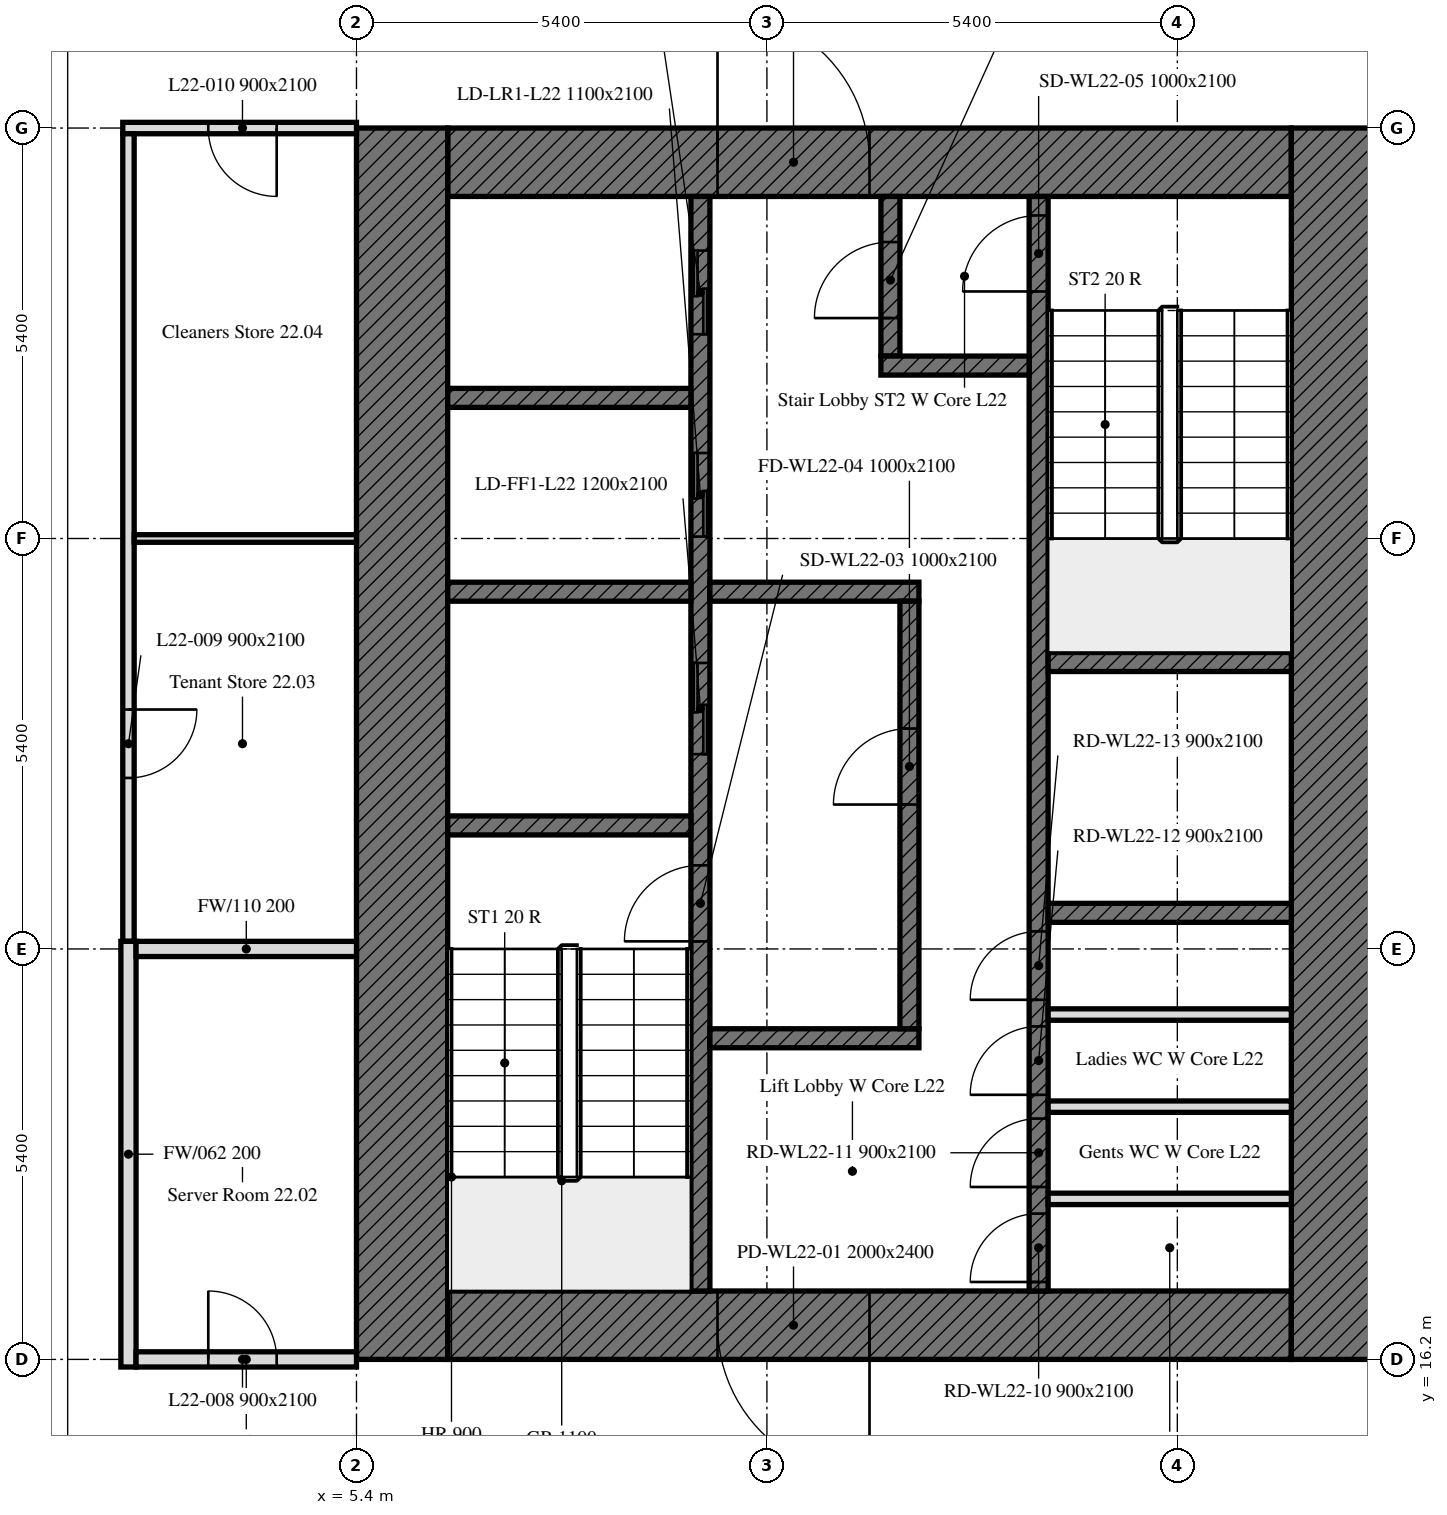
"""IFC4 building model, lengths in metres.
Left out: names, types, materials, properties, quantities, classifications, styles, units other than length and angle.
Written with IfcOpenShell. Run it as: python <this file> out.ifc"""

import sys

from ifc_helpers import new_model, si_unit, direction, frame, frame_2d, origin, place, context, subcontext, project, spatial, rectangle, extrude, element, fill, save


model = new_model("IFC4")
c1 = context("Model", 3, precision=1e-05, world=origin(), true_north=direction((0.0, 1.0)))
c2 = subcontext(c1, "Body", "Model", "MODEL_VIEW")
j1 = project(units=[si_unit("LENGTHUNIT", "METRE"), si_unit("PLANEANGLEUNIT", "RADIAN")], contexts=[c1])
p1 = place(None, origin())
s1 = spatial("IfcSite", under=j1, at=p1, CompositionType="ELEMENT")
p2 = place(p1, origin())
s2 = spatial("IfcBuilding", under=s1, at=p2, CompositionType="ELEMENT")
p3 = place(p2, frame((0.0, 0.0, 95.4)))
s3 = spatial("IfcBuildingStorey", under=s2, at=p3, CompositionType="ELEMENT", Elevation=95.4)
p4 = place(p3, frame((17.7, 16.65, 0.0), z_axis=(0.0, 0.0, 1.0), x_axis=(-1.0, 0.0, 0.0)))
e1 = element("IfcWall", 1, at=p4, inside=s3, PredefinedType="SOLIDWALL", context=c2, shape_type="SweptSolid", body=[
    extrude(rectangle(XDim=11.1, YDim=0.9, at=frame_2d((5.55, 0.0))), origin(), (0.0, 0.0, 1.0), 3.5),
])
p5 = place(p4, frame((5.55, 0.0, 0.0)))
e2 = element("IfcOpeningElement", 2, at=p5, cuts=e1, PredefinedType="OPENING", context=c2, shape_type="SweptSolid", body=[
    extrude(rectangle(XDim=2.0, YDim=2.4, at=frame_2d((1.0, 1.2))), frame((0.0, 0.45, 0.0), z_axis=(0.0, -1.0, 0.0), x_axis=(1.0, 0.0, 0.0)), (0.0, 0.0, 1.0), 0.9),
])
p6 = place(p3, frame((6.6, 31.95, 0.0), z_axis=(0.0, 0.0, 1.0), x_axis=(1.0, 0.0, 0.0)))
e3 = element("IfcWall", 3, at=p6, inside=s3, PredefinedType="SOLIDWALL", context=c2, shape_type="SweptSolid", body=[
    extrude(rectangle(XDim=11.1, YDim=0.9, at=frame_2d((5.55, 0.0))), origin(), (0.0, 0.0, 1.0), 3.5),
])
p7 = place(p6, frame((3.55, 0.0, 0.0)))
e4 = element("IfcOpeningElement", 4, at=p7, cuts=e3, PredefinedType="OPENING", context=c2, shape_type="SweptSolid", body=[
    extrude(rectangle(XDim=2.0, YDim=2.4, at=frame_2d((1.0, 1.2))), frame((0.0, 0.45, 0.0), z_axis=(0.0, -1.0, 0.0), x_axis=(1.0, 0.0, 0.0)), (0.0, 0.0, 1.0), 0.9),
])
for number, where, z_axis, x_axis in (
    (5, (6.0, 16.2, 0.0), (0.0, 0.0, 1.0), (0.0, 1.0, 0.0)),
    (6, (18.3, 32.4, 0.0), (0.0, 0.0, 1.0), (0.0, -1.0, 0.0)),
):
    element("IfcWall", number, at=place(p3, frame(where, z_axis=z_axis, x_axis=x_axis)), inside=s3, PredefinedType="SOLIDWALL", context=c2, shape_type="SweptSolid", body=[
        extrude(rectangle(XDim=16.2, YDim=1.2, at=frame_2d((8.1, 0.0))), origin(), (0.0, 0.0, 1.0), 3.5),
    ])
p8 = place(p3, frame((9.925, 17.1, 0.0), z_axis=(0.0, 0.0, 1.0), x_axis=(0.0, 1.0, 0.0)))
e7 = element("IfcWall", 7, at=p8, inside=s3, PredefinedType="SOLIDWALL", context=c2, shape_type="SweptSolid", body=[
    extrude(rectangle(XDim=14.4, YDim=0.25, at=frame_2d((7.2, 0.0))), origin(), (0.0, 0.0, 1.0), 3.5),
])
p9 = place(p8, frame((4.6, 0.0, 0.0)))
e8 = element("IfcOpeningElement", 8, at=p9, cuts=e7, PredefinedType="OPENING", context=c2, shape_type="SweptSolid", body=[
    extrude(rectangle(XDim=1.0, YDim=2.1, at=frame_2d((0.5, 1.05))), frame((0.0, 0.125, 0.0), z_axis=(0.0, -1.0, 0.0), x_axis=(1.0, 0.0, 0.0)), (0.0, 0.0, 1.0), 0.25),
])
p10 = place(p8, frame((7.062, 0.0, 0.0)))
e9 = element("IfcOpeningElement", 9, at=p10, cuts=e7, PredefinedType="OPENING", context=c2, shape_type="SweptSolid", body=[
    extrude(rectangle(XDim=1.2, YDim=2.1, at=frame_2d((0.6, 1.05))), frame((0.0, 0.125, 0.0), z_axis=(0.0, -1.0, 0.0), x_axis=(1.0, 0.0, 0.0)), (0.0, 0.0, 1.0), 0.25),
])
p11 = place(p8, frame((9.925, 0.0, 0.0)))
e10 = element("IfcOpeningElement", 10, at=p11, cuts=e7, PredefinedType="OPENING", context=c2, shape_type="SweptSolid", body=[
    extrude(rectangle(XDim=1.1, YDim=2.1, at=frame_2d((0.55, 1.05))), frame((0.0, 0.125, 0.0), z_axis=(0.0, -1.0, 0.0), x_axis=(1.0, 0.0, 0.0)), (0.0, 0.0, 1.0), 0.25),
])
p12 = place(p8, frame((12.587, 0.0, 0.0)))
e11 = element("IfcOpeningElement", 11, at=p12, cuts=e7, PredefinedType="OPENING", context=c2, shape_type="SweptSolid", body=[
    extrude(rectangle(XDim=1.1, YDim=2.1, at=frame_2d((0.55, 1.05))), frame((0.0, 0.125, 0.0), z_axis=(0.0, -1.0, 0.0), x_axis=(1.0, 0.0, 0.0)), (0.0, 0.0, 1.0), 0.25),
])
p13 = place(p3, frame((14.375, 17.1, 0.0), z_axis=(0.0, 0.0, 1.0), x_axis=(0.0, 1.0, 0.0)))
e12 = element("IfcWall", 12, at=p13, inside=s3, PredefinedType="SOLIDWALL", context=c2, shape_type="SweptSolid", body=[
    extrude(rectangle(XDim=14.4, YDim=0.25, at=frame_2d((7.2, 0.0))), origin(), (0.0, 0.0, 1.0), 3.5),
])
p14 = place(p13, frame((13.15, 0.0, 0.0)))
e13 = element("IfcOpeningElement", 13, at=p14, cuts=e12, PredefinedType="OPENING", context=c2, shape_type="SweptSolid", body=[
    extrude(rectangle(XDim=1.0, YDim=2.1, at=frame_2d((0.5, 1.05))), frame((0.0, 0.125, 0.0), z_axis=(0.0, -1.0, 0.0), x_axis=(1.0, 0.0, 0.0)), (0.0, 0.0, 1.0), 0.25),
])
p15 = place(p13, frame((0.118, 0.0, 0.0)))
e14 = element("IfcOpeningElement", 14, at=p15, cuts=e12, PredefinedType="OPENING", context=c2, shape_type="SweptSolid", body=[
    extrude(rectangle(XDim=0.9, YDim=2.1, at=frame_2d((0.45, 1.05))), frame((0.0, 0.125, 0.0), z_axis=(0.0, -1.0, 0.0), x_axis=(1.0, 0.0, 0.0)), (0.0, 0.0, 1.0), 0.25),
])
p16 = place(p13, frame((1.368, 0.0, 0.0)))
e15 = element("IfcOpeningElement", 15, at=p16, cuts=e12, PredefinedType="OPENING", context=c2, shape_type="SweptSolid", body=[
    extrude(rectangle(XDim=0.9, YDim=2.1, at=frame_2d((0.45, 1.05))), frame((0.0, 0.125, 0.0), z_axis=(0.0, -1.0, 0.0), x_axis=(1.0, 0.0, 0.0)), (0.0, 0.0, 1.0), 0.25),
])
p17 = place(p13, frame((2.581, 0.0, 0.0)))
e16 = element("IfcOpeningElement", 16, at=p17, cuts=e12, PredefinedType="OPENING", context=c2, shape_type="SweptSolid", body=[
    extrude(rectangle(XDim=0.9, YDim=2.1, at=frame_2d((0.45, 1.05))), frame((0.0, 0.125, 0.0), z_axis=(0.0, -1.0, 0.0), x_axis=(1.0, 0.0, 0.0)), (0.0, 0.0, 1.0), 0.25),
])
p18 = place(p13, frame((3.831, 0.0, 0.0)))
e17 = element("IfcOpeningElement", 17, at=p18, cuts=e12, PredefinedType="OPENING", context=c2, shape_type="SweptSolid", body=[
    extrude(rectangle(XDim=0.9, YDim=2.1, at=frame_2d((0.45, 1.05))), frame((0.0, 0.125, 0.0), z_axis=(0.0, -1.0, 0.0), x_axis=(1.0, 0.0, 0.0)), (0.0, 0.0, 1.0), 0.25),
])
for number, where, z_axis, x_axis in (
    (18, (6.6, 23.225, 0.0), (0.0, 0.0, 1.0), (1.0, 0.0, 0.0)),
    (19, (14.5, 25.375, 0.0), (0.0, 0.0, 1.0), (1.0, 0.0, 0.0)),
    (20, (14.5, 22.075, 0.0), (0.0, 0.0, 1.0), (1.0, 0.0, 0.0)),
    (21, (6.6, 26.3, 0.0), (0.0, 0.0, 1.0), (1.0, 0.0, 0.0)),
):
    element("IfcWall", number, at=place(p3, frame(where, z_axis=z_axis, x_axis=x_axis)), inside=s3, PredefinedType="SOLIDWALL", context=c2, shape_type="SweptSolid", body=[
        extrude(rectangle(XDim=3.2, YDim=0.25, at=frame_2d((1.6, 0.0))), origin(), (0.0, 0.0, 1.0), 3.5),
    ])
for number, where, z_axis, x_axis in (
    (22, (10.05, 26.3, 0.0), (0.0, 0.0, 1.0), (1.0, 0.0, 0.0)),
    (23, (10.05, 20.425, 0.0), (0.0, 0.0, 1.0), (1.0, 0.0, 0.0)),
):
    element("IfcWall", number, at=place(p3, frame(where, z_axis=z_axis, x_axis=x_axis)), inside=s3, PredefinedType="SOLIDWALL", context=c2, shape_type="SweptSolid", body=[
        extrude(rectangle(XDim=2.75, YDim=0.25, at=frame_2d((1.375, 0.0))), origin(), (0.0, 0.0, 1.0), 3.5),
    ])
p19 = place(p3, frame((12.425, 29.4, 0.0), z_axis=(0.0, 0.0, 1.0), x_axis=(0.0, 1.0, 0.0)))
e24 = element("IfcWall", 24, at=p19, inside=s3, PredefinedType="SOLIDWALL", context=c2, shape_type="SweptSolid", body=[
    extrude(rectangle(XDim=2.1, YDim=0.25, at=frame_2d((1.05, 0.0))), origin(), (0.0, 0.0, 1.0), 3.5),
])
p20 = place(p19, frame((0.5, 0.0, 0.0)))
e25 = element("IfcOpeningElement", 25, at=p20, cuts=e24, PredefinedType="OPENING", context=c2, shape_type="SweptSolid", body=[
    extrude(rectangle(XDim=1.0, YDim=2.1, at=frame_2d((0.5, 1.05))), frame((0.0, 0.125, 0.0), z_axis=(0.0, -1.0, 0.0), x_axis=(1.0, 0.0, 0.0)), (0.0, 0.0, 1.0), 0.25),
])
p21 = place(p3, frame((12.3, 29.275, 0.0), z_axis=(0.0, 0.0, 1.0), x_axis=(1.0, 0.0, 0.0)))
e26 = element("IfcWall", 26, at=p21, inside=s3, PredefinedType="SOLIDWALL", context=c2, shape_type="SweptSolid", body=[
    extrude(rectangle(XDim=1.95, YDim=0.25, at=frame_2d((0.975, 0.0))), origin(), (0.0, 0.0, 1.0), 3.5),
])
p22 = place(p3, frame((12.675, 20.55, 0.0), z_axis=(0.0, 0.0, 1.0), x_axis=(0.0, 1.0, 0.0)))
e27 = element("IfcWall", 27, at=p22, inside=s3, PredefinedType="SOLIDWALL", context=c2, shape_type="SweptSolid", body=[
    extrude(rectangle(XDim=5.625, YDim=0.25, at=frame_2d((2.812, 0.0))), origin(), (0.0, 0.0, 1.0), 3.5),
])
p23 = place(p22, frame((2.95, 0.0, 0.0)))
e28 = element("IfcOpeningElement", 28, at=p23, cuts=e27, PredefinedType="OPENING", context=c2, shape_type="SweptSolid", body=[
    extrude(rectangle(XDim=1.0, YDim=2.1, at=frame_2d((0.5, 1.05))), frame((0.0, 0.125, 0.0), z_axis=(0.0, -1.0, 0.0), x_axis=(1.0, 0.0, 0.0)), (0.0, 0.0, 1.0), 0.25),
])
p24 = place(p3, frame((6.6, 28.85, 0.0), z_axis=(0.0, 0.0, 1.0), x_axis=(1.0, 0.0, 0.0)))
e29 = element("IfcWall", 29, at=p24, inside=s3, PredefinedType="SOLIDWALL", context=c2, shape_type="SweptSolid", body=[
    extrude(rectangle(XDim=3.2, YDim=0.25, at=frame_2d((1.6, 0.0))), origin(), (0.0, 0.0, 1.0), 3.5),
])
for number, where, z_axis, x_axis in (
    (30, (14.5, 18.312, 0.0), (0.0, 0.0, 1.0), (1.0, 0.0, 0.0)),
    (31, (14.5, 19.525, 0.0), (0.0, 0.0, 1.0), (1.0, 0.0, 0.0)),
    (32, (14.5, 20.737, 0.0), (0.0, 0.0, 1.0), (1.0, 0.0, 0.0)),
):
    element("IfcWall", number, at=place(p3, frame(where, z_axis=z_axis, x_axis=x_axis)), inside=s3, PredefinedType="PARTITIONING", context=c2, shape_type="SweptSolid", body=[
        extrude(rectangle(XDim=3.2, YDim=0.15, at=frame_2d((1.6, 0.0))), origin(), (0.0, 0.0, 1.0), 3.5),
    ])
p25 = place(p3, frame((5.4, 32.4, 0.0), z_axis=(0.0, 0.0, 1.0), x_axis=(-1.0, 0.0, 0.0)))
e33 = element("IfcWall", 33, at=p25, inside=s3, PredefinedType="PARTITIONING", context=c2, shape_type="SweptSolid", body=[
    extrude(rectangle(XDim=3.075, YDim=0.15, at=frame_2d((1.538, 0.0))), origin(), (0.0, 0.0, 1.0), 2.75),
])
p26 = place(p25, frame((1.05, 0.0, 0.0)))
e34 = element("IfcOpeningElement", 34, at=p26, cuts=e33, PredefinedType="OPENING", context=c2, shape_type="SweptSolid", body=[
    extrude(rectangle(XDim=0.9, YDim=2.1, at=frame_2d((0.45, 1.05))), frame((0.0, 0.075, 0.0), z_axis=(0.0, -1.0, 0.0), x_axis=(1.0, 0.0, 0.0)), (0.0, 0.0, 1.0), 0.15),
])
p27 = place(p3, frame((2.4, 32.325, 0.0), z_axis=(0.0, 0.0, 1.0), x_axis=(0.0, -1.0, 0.0)))
e35 = element("IfcWall", 35, at=p27, inside=s3, PredefinedType="PARTITIONING", context=c2, shape_type="SweptSolid", body=[
    extrude(rectangle(XDim=10.625, YDim=0.15, at=frame_2d((5.312, 0.0))), origin(), (0.0, 0.0, 1.0), 3.5),
])
p28 = place(p27, frame((7.575, 0.0, 0.0)))
e36 = element("IfcOpeningElement", 36, at=p28, cuts=e35, PredefinedType="OPENING", context=c2, shape_type="SweptSolid", body=[
    extrude(rectangle(XDim=0.9, YDim=2.1, at=frame_2d((0.45, 1.05))), frame((0.0, 0.075, 0.0), z_axis=(0.0, -1.0, 0.0), x_axis=(1.0, 0.0, 0.0)), (0.0, 0.0, 1.0), 0.15),
])
p29 = place(p3, frame((2.4, 21.7, 0.0), z_axis=(0.0, 0.0, 1.0), x_axis=(0.0, -1.0, 0.0)))
e37 = element("IfcWall", 37, at=p29, inside=s3, PredefinedType="PARTITIONING", context=c2, shape_type="SweptSolid", body=[
    extrude(rectangle(XDim=5.6, YDim=0.2, at=frame_2d((2.8, 0.0))), origin(), (0.0, 0.0, 1.0), 3.5),
])
p30 = place(p3, frame((2.5, 16.2, 0.0), z_axis=(0.0, 0.0, 1.0), x_axis=(1.0, 0.0, 0.0)))
e38 = element("IfcWall", 38, at=p30, inside=s3, PredefinedType="PARTITIONING", context=c2, shape_type="SweptSolid", body=[
    extrude(rectangle(XDim=2.9, YDim=0.2, at=frame_2d((1.45, 0.0))), origin(), (0.0, 0.0, 1.0), 2.75),
])
p31 = place(p30, frame((0.95, 0.0, 0.0)))
e39 = element("IfcOpeningElement", 39, at=p31, cuts=e38, PredefinedType="OPENING", context=c2, shape_type="SweptSolid", body=[
    extrude(rectangle(XDim=0.9, YDim=2.1, at=frame_2d((0.45, 1.05))), frame((0.0, 0.1, 0.0), z_axis=(0.0, -1.0, 0.0), x_axis=(1.0, 0.0, 0.0)), (0.0, 0.0, 1.0), 0.2),
])
p32 = place(p3, frame((5.4, 21.6, 0.0), z_axis=(0.0, 0.0, 1.0), x_axis=(-1.0, 0.0, 0.0)))
e40 = element("IfcWall", 40, at=p32, inside=s3, PredefinedType="PARTITIONING", context=c2, shape_type="SweptSolid", body=[
    extrude(rectangle(XDim=2.9, YDim=0.2, at=frame_2d((1.45, 0.0))), origin(), (0.0, 0.0, 1.0), 2.75),
])
p33 = place(p3, frame((5.4, 27.0, 0.0), z_axis=(0.0, 0.0, 1.0), x_axis=(-1.0, 0.0, 0.0)))
e41 = element("IfcWall", 41, at=p33, inside=s3, PredefinedType="PARTITIONING", context=c2, shape_type="SweptSolid", body=[
    extrude(rectangle(XDim=2.925, YDim=0.1, at=frame_2d((1.462, 0.0))), origin(), (0.0, 0.0, 1.0), 2.75),
])
p34 = place(p5, origin())
e42 = element("IfcDoor", 42, at=p34, inside=s3, OperationType="DOUBLE_DOOR_SINGLE_SWING", PredefinedType="DOOR", context=c2, shape_type="SweptSolid", body=[
    extrude(rectangle(XDim=2.0, YDim=2.4, at=frame_2d((1.0, 1.2))), frame((0.0, 0.025, 0.0), z_axis=(0.0, -1.0, 0.0), x_axis=(1.0, 0.0, 0.0)), (0.0, 0.0, 1.0), 0.05),
])
fill(e2, e42)
p35 = place(p7, origin())
e43 = element("IfcDoor", 43, at=p35, inside=s3, OperationType="DOUBLE_DOOR_SINGLE_SWING", PredefinedType="DOOR", context=c2, shape_type="SweptSolid", body=[
    extrude(rectangle(XDim=2.0, YDim=2.4, at=frame_2d((1.0, 1.2))), frame((0.0, 0.025, 0.0), z_axis=(0.0, -1.0, 0.0), x_axis=(1.0, 0.0, 0.0)), (0.0, 0.0, 1.0), 0.05),
])
fill(e4, e43)
p36 = place(p9, origin())
e44 = element("IfcDoor", 44, at=p36, inside=s3, OperationType="SINGLE_SWING_LEFT", PredefinedType="DOOR", context=c2, shape_type="SweptSolid", body=[
    extrude(rectangle(XDim=1.0, YDim=2.1, at=frame_2d((0.5, 1.05))), frame((0.0, 0.025, 0.0), z_axis=(0.0, -1.0, 0.0), x_axis=(1.0, 0.0, 0.0)), (0.0, 0.0, 1.0), 0.05),
])
fill(e8, e44)
p37 = place(p23, origin())
e45 = element("IfcDoor", 45, at=p37, inside=s3, OperationType="SINGLE_SWING_LEFT", PredefinedType="DOOR", context=c2, shape_type="SweptSolid", body=[
    extrude(rectangle(XDim=1.0, YDim=2.1, at=frame_2d((0.5, 1.05))), frame((0.0, 0.025, 0.0), z_axis=(0.0, -1.0, 0.0), x_axis=(1.0, 0.0, 0.0)), (0.0, 0.0, 1.0), 0.05),
])
fill(e28, e45)
p38 = place(p14, origin())
e46 = element("IfcDoor", 46, at=p38, inside=s3, OperationType="SINGLE_SWING_LEFT", PredefinedType="DOOR", context=c2, shape_type="SweptSolid", body=[
    extrude(rectangle(XDim=1.0, YDim=2.1, at=frame_2d((0.5, 1.05))), frame((0.0, 0.025, 0.0), z_axis=(0.0, -1.0, 0.0), x_axis=(1.0, 0.0, 0.0)), (0.0, 0.0, 1.0), 0.05),
])
fill(e13, e46)
p39 = place(p20, origin())
e47 = element("IfcDoor", 47, at=p39, inside=s3, OperationType="SINGLE_SWING_LEFT", PredefinedType="DOOR", context=c2, shape_type="SweptSolid", body=[
    extrude(rectangle(XDim=1.0, YDim=2.1, at=frame_2d((0.5, 1.05))), frame((0.0, 0.025, 0.0), z_axis=(0.0, -1.0, 0.0), x_axis=(1.0, 0.0, 0.0)), (0.0, 0.0, 1.0), 0.05),
])
fill(e25, e47)
p40 = place(p10, origin())
e48 = element("IfcDoor", 48, at=p40, inside=s3, OperationType="DOUBLE_DOOR_SLIDING", PredefinedType="DOOR", context=c2, shape_type="SweptSolid", body=[
    extrude(rectangle(XDim=1.2, YDim=2.1, at=frame_2d((0.6, 1.05))), frame((0.0, 0.025, 0.0), z_axis=(0.0, -1.0, 0.0), x_axis=(1.0, 0.0, 0.0)), (0.0, 0.0, 1.0), 0.05),
])
fill(e9, e48)
p41 = place(p11, origin())
e49 = element("IfcDoor", 49, at=p41, inside=s3, OperationType="DOUBLE_DOOR_SLIDING", PredefinedType="DOOR", context=c2, shape_type="SweptSolid", body=[
    extrude(rectangle(XDim=1.1, YDim=2.1, at=frame_2d((0.55, 1.05))), frame((0.0, 0.025, 0.0), z_axis=(0.0, -1.0, 0.0), x_axis=(1.0, 0.0, 0.0)), (0.0, 0.0, 1.0), 0.05),
])
fill(e10, e49)
p42 = place(p12, origin())
e50 = element("IfcDoor", 50, at=p42, inside=s3, OperationType="DOUBLE_DOOR_SLIDING", PredefinedType="DOOR", context=c2, shape_type="SweptSolid", body=[
    extrude(rectangle(XDim=1.1, YDim=2.1, at=frame_2d((0.55, 1.05))), frame((0.0, 0.025, 0.0), z_axis=(0.0, -1.0, 0.0), x_axis=(1.0, 0.0, 0.0)), (0.0, 0.0, 1.0), 0.05),
])
fill(e11, e50)
p43 = place(p15, origin())
e51 = element("IfcDoor", 51, at=p43, inside=s3, OperationType="SINGLE_SWING_LEFT", PredefinedType="DOOR", context=c2, shape_type="SweptSolid", body=[
    extrude(rectangle(XDim=0.9, YDim=2.1, at=frame_2d((0.45, 1.05))), frame((0.0, 0.025, 0.0), z_axis=(0.0, -1.0, 0.0), x_axis=(1.0, 0.0, 0.0)), (0.0, 0.0, 1.0), 0.05),
])
fill(e14, e51)
p44 = place(p16, origin())
e52 = element("IfcDoor", 52, at=p44, inside=s3, OperationType="SINGLE_SWING_LEFT", PredefinedType="DOOR", context=c2, shape_type="SweptSolid", body=[
    extrude(rectangle(XDim=0.9, YDim=2.1, at=frame_2d((0.45, 1.05))), frame((0.0, 0.025, 0.0), z_axis=(0.0, -1.0, 0.0), x_axis=(1.0, 0.0, 0.0)), (0.0, 0.0, 1.0), 0.05),
])
fill(e15, e52)
p45 = place(p17, origin())
e53 = element("IfcDoor", 53, at=p45, inside=s3, OperationType="SINGLE_SWING_LEFT", PredefinedType="DOOR", context=c2, shape_type="SweptSolid", body=[
    extrude(rectangle(XDim=0.9, YDim=2.1, at=frame_2d((0.45, 1.05))), frame((0.0, 0.025, 0.0), z_axis=(0.0, -1.0, 0.0), x_axis=(1.0, 0.0, 0.0)), (0.0, 0.0, 1.0), 0.05),
])
fill(e16, e53)
p46 = place(p18, origin())
e54 = element("IfcDoor", 54, at=p46, inside=s3, OperationType="SINGLE_SWING_LEFT", PredefinedType="DOOR", context=c2, shape_type="SweptSolid", body=[
    extrude(rectangle(XDim=0.9, YDim=2.1, at=frame_2d((0.45, 1.05))), frame((0.0, 0.025, 0.0), z_axis=(0.0, -1.0, 0.0), x_axis=(1.0, 0.0, 0.0)), (0.0, 0.0, 1.0), 0.05),
])
fill(e17, e54)
p47 = place(p31, origin())
e55 = element("IfcDoor", 55, at=p47, inside=s3, OperationType="SINGLE_SWING_LEFT", PredefinedType="DOOR", context=c2, shape_type="SweptSolid", body=[
    extrude(rectangle(XDim=0.9, YDim=2.1, at=frame_2d((0.45, 1.05))), frame((0.0, 0.025, 0.0), z_axis=(0.0, -1.0, 0.0), x_axis=(1.0, 0.0, 0.0)), (0.0, 0.0, 1.0), 0.05),
])
fill(e39, e55)
p48 = place(p28, origin())
e56 = element("IfcDoor", 56, at=p48, inside=s3, OperationType="SINGLE_SWING_LEFT", PredefinedType="DOOR", context=c2, shape_type="SweptSolid", body=[
    extrude(rectangle(XDim=0.9, YDim=2.1, at=frame_2d((0.45, 1.05))), frame((0.0, 0.025, 0.0), z_axis=(0.0, -1.0, 0.0), x_axis=(1.0, 0.0, 0.0)), (0.0, 0.0, 1.0), 0.05),
])
fill(e36, e56)
p49 = place(p26, origin())
e57 = element("IfcDoor", 57, at=p49, inside=s3, OperationType="SINGLE_SWING_LEFT", PredefinedType="DOOR", context=c2, shape_type="SweptSolid", body=[
    extrude(rectangle(XDim=0.9, YDim=2.1, at=frame_2d((0.45, 1.05))), frame((0.0, 0.025, 0.0), z_axis=(0.0, -1.0, 0.0), x_axis=(1.0, 0.0, 0.0)), (0.0, 0.0, 1.0), 0.05),
])
fill(e34, e57)
save(model, sys.argv[1])
